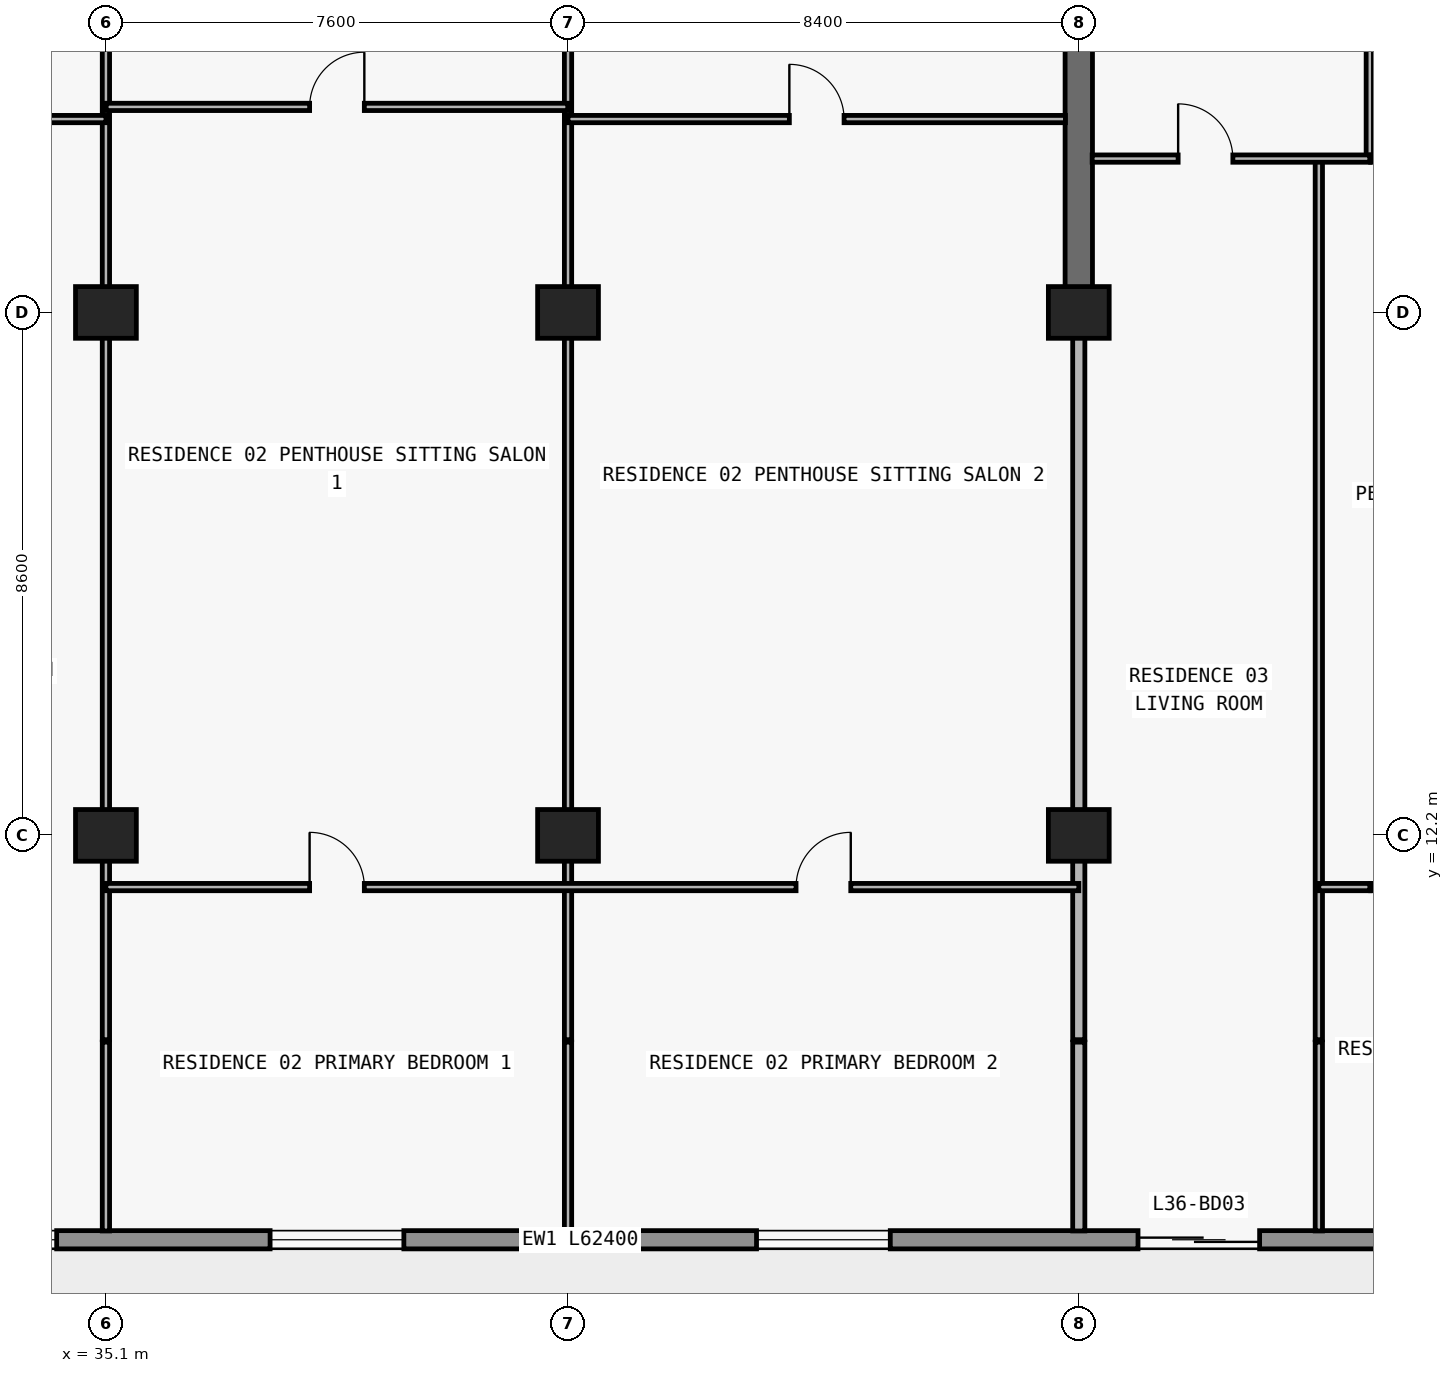
"""IFC4 building model, lengths in metres.
Left out: names, types, materials, properties, quantities, classifications, styles, units other than length and angle.
Written with IfcOpenShell. Run it as: python <this file> out.ifc"""

import sys

from ifc_helpers import new_model, si_unit, direction, frame, frame_2d, origin, origin_2d, place, context, subcontext, project, spatial, rectangle, extrude, element, fill, save


model = new_model("IFC4")
c1 = context("Model", 3, precision=1e-05, world=origin(), true_north=direction((0.0, 1.0)))
c2 = subcontext(c1, "Body", "Model", "MODEL_VIEW")
j1 = project(units=[si_unit("LENGTHUNIT", "METRE"), si_unit("PLANEANGLEUNIT", "RADIAN")], contexts=[c1])
p1 = place(None, origin())
s1 = spatial("IfcSite", under=j1, at=p1, CompositionType="ELEMENT")
p2 = place(p1, origin())
s2 = spatial("IfcBuilding", under=s1, at=p2, CompositionType="ELEMENT")
p3 = place(p2, frame((0.0, 0.0, 132.3)))
s3 = spatial("IfcBuildingStorey", under=s2, at=p3, CompositionType="ELEMENT", Elevation=132.3)
for number, where, z_axis, x_axis in (
    (1, (35.1, 12.2, 0.0), (0.0, 0.0, 1.0), (1.0, 0.0, 0.0)),
    (2, (42.7, 12.2, 0.0), (0.0, 0.0, 1.0), (1.0, 0.0, 0.0)),
    (3, (51.1, 12.2, 0.0), (0.0, 0.0, 1.0), (1.0, 0.0, 0.0)),
    (4, (35.1, 20.8, 0.0), (0.0, 0.0, 1.0), (1.0, 0.0, 0.0)),
    (5, (42.7, 20.8, 0.0), (0.0, 0.0, 1.0), (1.0, 0.0, 0.0)),
    (6, (51.1, 20.8, 0.0), (0.0, 0.0, 1.0), (1.0, 0.0, 0.0)),
):
    element("IfcColumn", number, at=place(p3, frame(where, z_axis=z_axis, x_axis=x_axis)), inside=s3, PredefinedType="COLUMN", context=c2, shape_type="SweptSolid", body=[
        extrude(rectangle(XDim=1.0, YDim=0.85, at=origin_2d()), origin(), (0.0, 0.0, 1.0), 3.05),
    ])
p4 = place(p3, frame((51.1, 20.8, 0.0), z_axis=(0.0, 0.0, 1.0), x_axis=(0.0, 1.0, 0.0)))
e7 = element("IfcWall", 7, at=p4, inside=s3, PredefinedType="SHEAR", context=c2, shape_type="SweptSolid", body=[
    extrude(rectangle(XDim=8.6, YDim=0.45, at=frame_2d((4.3, 0.0))), origin(), (0.0, 0.0, 1.0), 3.05),
])
p5 = place(p3, frame((70.1, 5.55, 0.0), z_axis=(0.0, 0.0, 1.0), x_axis=(-1.0, 0.0, 0.0)))
e8 = element("IfcWall", 8, at=p5, inside=s3, PredefinedType="STANDARD", context=c2, shape_type="SweptSolid", body=[
    extrude(rectangle(XDim=62.4, YDim=0.3, at=frame_2d((31.2, 0.0))), origin(), (0.0, 0.0, 1.0), 3.05),
])
p6 = place(p5, frame((57.29, 0.0, 0.0)))
e9 = element("IfcOpeningElement", 9, at=p6, cuts=e8, PredefinedType="OPENING", context=c2, shape_type="SweptSolid", body=[
    extrude(rectangle(XDim=2.0, YDim=2.3, at=frame_2d((1.0, 1.15))), frame((0.0, 0.16, 0.0), z_axis=(0.0, -1.0, 0.0), x_axis=(1.0, 0.0, 0.0)), (0.0, 0.0, 1.0), 0.32),
])
p7 = place(p5, frame((52.61, 0.0, 0.65)))
e10 = element("IfcOpeningElement", 10, at=p7, cuts=e8, PredefinedType="OPENING", context=c2, shape_type="SweptSolid", body=[
    extrude(rectangle(XDim=2.6, YDim=1.85, at=frame_2d((1.3, 0.925))), frame((0.0, 0.16, 0.0), z_axis=(0.0, -1.0, 0.0), x_axis=(1.0, 0.0, 0.0)), (0.0, 0.0, 1.0), 0.32),
])
p8 = place(p5, frame((46.5, 0.0, 0.85)))
e11 = element("IfcOpeningElement", 11, at=p8, cuts=e8, PredefinedType="OPENING", context=c2, shape_type="SweptSolid", body=[
    extrude(rectangle(XDim=2.2, YDim=1.55, at=frame_2d((1.1, 0.775))), frame((0.0, 0.16, 0.0), z_axis=(0.0, -1.0, 0.0), x_axis=(1.0, 0.0, 0.0)), (0.0, 0.0, 1.0), 0.32),
])
p9 = place(p5, frame((40.49, 0.0, 0.0)))
e12 = element("IfcOpeningElement", 12, at=p9, cuts=e8, PredefinedType="OPENING", context=c2, shape_type="SweptSolid", body=[
    extrude(rectangle(XDim=2.0, YDim=2.3, at=frame_2d((1.0, 1.15))), frame((0.0, 0.16, 0.0), z_axis=(0.0, -1.0, 0.0), x_axis=(1.0, 0.0, 0.0)), (0.0, 0.0, 1.0), 0.32),
])
p10 = place(p5, frame((35.81, 0.0, 0.65)))
e13 = element("IfcOpeningElement", 13, at=p10, cuts=e8, PredefinedType="OPENING", context=c2, shape_type="SweptSolid", body=[
    extrude(rectangle(XDim=2.6, YDim=1.85, at=frame_2d((1.3, 0.925))), frame((0.0, 0.16, 0.0), z_axis=(0.0, -1.0, 0.0), x_axis=(1.0, 0.0, 0.0)), (0.0, 0.0, 1.0), 0.32),
])
p11 = place(p5, frame((30.1, 0.0, 0.85)))
e14 = element("IfcOpeningElement", 14, at=p11, cuts=e8, PredefinedType="OPENING", context=c2, shape_type="SweptSolid", body=[
    extrude(rectangle(XDim=2.2, YDim=1.55, at=frame_2d((1.1, 0.775))), frame((0.0, 0.16, 0.0), z_axis=(0.0, -1.0, 0.0), x_axis=(1.0, 0.0, 0.0)), (0.0, 0.0, 1.0), 0.32),
])
p12 = place(p5, frame((22.1, 0.0, 0.85)))
e15 = element("IfcOpeningElement", 15, at=p12, cuts=e8, PredefinedType="OPENING", context=c2, shape_type="SweptSolid", body=[
    extrude(rectangle(XDim=2.2, YDim=1.55, at=frame_2d((1.1, 0.775))), frame((0.0, 0.16, 0.0), z_axis=(0.0, -1.0, 0.0), x_axis=(1.0, 0.0, 0.0)), (0.0, 0.0, 1.0), 0.32),
])
p13 = place(p5, frame((16.026, 0.0, 0.0)))
e16 = element("IfcOpeningElement", 16, at=p13, cuts=e8, PredefinedType="OPENING", context=c2, shape_type="SweptSolid", body=[
    extrude(rectangle(XDim=2.0, YDim=2.3, at=frame_2d((1.0, 1.15))), frame((0.0, 0.16, 0.0), z_axis=(0.0, -1.0, 0.0), x_axis=(1.0, 0.0, 0.0)), (0.0, 0.0, 1.0), 0.32),
])
p14 = place(p5, frame((11.726, 0.0, 0.85)))
e17 = element("IfcOpeningElement", 17, at=p14, cuts=e8, PredefinedType="OPENING", context=c2, shape_type="SweptSolid", body=[
    extrude(rectangle(XDim=2.2, YDim=1.55, at=frame_2d((1.1, 0.775))), frame((0.0, 0.16, 0.0), z_axis=(0.0, -1.0, 0.0), x_axis=(1.0, 0.0, 0.0)), (0.0, 0.0, 1.0), 0.32),
])
p15 = place(p5, frame((7.29, 0.0, 0.0)))
e18 = element("IfcOpeningElement", 18, at=p15, cuts=e8, PredefinedType="OPENING", context=c2, shape_type="SweptSolid", body=[
    extrude(rectangle(XDim=2.0, YDim=2.3, at=frame_2d((1.0, 1.15))), frame((0.0, 0.16, 0.0), z_axis=(0.0, -1.0, 0.0), x_axis=(1.0, 0.0, 0.0)), (0.0, 0.0, 1.0), 0.32),
])
p16 = place(p5, frame((3.19, 0.0, 0.85)))
e19 = element("IfcOpeningElement", 19, at=p16, cuts=e8, PredefinedType="OPENING", context=c2, shape_type="SweptSolid", body=[
    extrude(rectangle(XDim=1.8, YDim=1.55, at=frame_2d((0.9, 0.775))), frame((0.0, 0.16, 0.0), z_axis=(0.0, -1.0, 0.0), x_axis=(1.0, 0.0, 0.0)), (0.0, 0.0, 1.0), 0.32),
])
p17 = place(p3, frame((35.1, 5.695, 0.0), z_axis=(0.0, 0.0, 1.0), x_axis=(0.0, 1.0, 0.0)))
e20 = element("IfcWall", 20, at=p17, inside=s3, PredefinedType="PARTITIONING", context=c2, shape_type="SweptSolid", body=[
    extrude(rectangle(XDim=3.105, YDim=0.12, at=frame_2d((1.552, 0.0))), origin(), (0.0, 0.0, 1.0), 3.05),
])
p18 = place(p3, frame((35.1, 8.84, 0.0), z_axis=(0.0, 0.0, 1.0), x_axis=(0.0, 1.0, 0.0)))
e21 = element("IfcWall", 21, at=p18, inside=s3, PredefinedType="PARTITIONING", context=c2, shape_type="SweptSolid", body=[
    extrude(rectangle(XDim=19.94, YDim=0.12, at=frame_2d((9.97, 0.0))), origin(), (0.0, 0.0, 1.0), 2.174),
])
p19 = place(p18, frame((17.09, 0.0, 0.0)))
e22 = element("IfcOpeningElement", 22, at=p19, cuts=e21, PredefinedType="OPENING", context=c2, shape_type="SweptSolid", body=[
    extrude(rectangle(XDim=0.9, YDim=2.124, at=frame_2d((0.45, 1.062))), frame((0.0, 0.07, 0.0), z_axis=(0.0, -1.0, 0.0), x_axis=(1.0, 0.0, 0.0)), (0.0, 0.0, 1.0), 0.14),
])
p20 = place(p3, frame((42.7, 5.695, 0.0), z_axis=(0.0, 0.0, 1.0), x_axis=(0.0, 1.0, 0.0)))
e23 = element("IfcWall", 23, at=p20, inside=s3, PredefinedType="PARTITIONING", context=c2, shape_type="SweptSolid", body=[
    extrude(rectangle(XDim=3.105, YDim=0.12, at=frame_2d((1.552, 0.0))), origin(), (0.0, 0.0, 1.0), 3.05),
])
p21 = place(p3, frame((42.7, 8.84, 0.0), z_axis=(0.0, 0.0, 1.0), x_axis=(0.0, 1.0, 0.0)))
e24 = element("IfcWall", 24, at=p21, inside=s3, PredefinedType="PARTITIONING", context=c2, shape_type="SweptSolid", body=[
    extrude(rectangle(XDim=19.94, YDim=0.12, at=frame_2d((9.97, 0.0))), origin(), (0.0, 0.0, 1.0), 2.174),
])
p22 = place(p21, frame((17.09, 0.0, 0.0)))
e25 = element("IfcOpeningElement", 25, at=p22, cuts=e24, PredefinedType="OPENING", context=c2, shape_type="SweptSolid", body=[
    extrude(rectangle(XDim=0.9, YDim=2.124, at=frame_2d((0.45, 1.062))), frame((0.0, 0.07, 0.0), z_axis=(0.0, -1.0, 0.0), x_axis=(1.0, 0.0, 0.0)), (0.0, 0.0, 1.0), 0.14),
])
p23 = place(p3, frame((51.1, 5.695, 0.0), z_axis=(0.0, 0.0, 1.0), x_axis=(0.0, 1.0, 0.0)))
e26 = element("IfcWall", 26, at=p23, inside=s3, PredefinedType="PARTITIONING", context=c2, shape_type="SweptSolid", body=[
    extrude(rectangle(XDim=3.105, YDim=0.2, at=frame_2d((1.552, 0.0))), origin(), (0.0, 0.0, 1.0), 3.05),
])
p24 = place(p3, frame((51.1, 8.84, 0.0), z_axis=(0.0, 0.0, 1.0), x_axis=(0.0, 1.0, 0.0)))
e27 = element("IfcWall", 27, at=p24, inside=s3, PredefinedType="PARTITIONING", context=c2, shape_type="SweptSolid", body=[
    extrude(rectangle(XDim=11.955, YDim=0.2, at=frame_2d((5.978, 0.0))), origin(), (0.0, 0.0, 1.0), 2.174),
])
p25 = place(p3, frame((55.048, 5.695, 0.0), z_axis=(0.0, 0.0, 1.0), x_axis=(0.0, 1.0, 0.0)))
e28 = element("IfcWall", 28, at=p25, inside=s3, PredefinedType="PARTITIONING", context=c2, shape_type="SweptSolid", body=[
    extrude(rectangle(XDim=3.105, YDim=0.12, at=frame_2d((1.552, 0.0))), origin(), (0.0, 0.0, 1.0), 3.05),
])
p26 = place(p3, frame((55.048, 8.84, 0.0), z_axis=(0.0, 0.0, 1.0), x_axis=(0.0, 1.0, 0.0)))
e29 = element("IfcWall", 29, at=p26, inside=s3, PredefinedType="PARTITIONING", context=c2, shape_type="SweptSolid", body=[
    extrude(rectangle(XDim=14.49, YDim=0.12, at=frame_2d((7.245, 0.0))), origin(), (0.0, 0.0, 1.0), 3.05),
])
p27 = place(p3, frame((55.886, 23.33, 0.0), z_axis=(0.0, 0.0, 1.0), x_axis=(0.0, 1.0, 0.0)))
e30 = element("IfcWall", 30, at=p27, inside=s3, PredefinedType="PARTITIONING", context=c2, shape_type="SweptSolid", body=[
    extrude(rectangle(XDim=5.15, YDim=0.12, at=frame_2d((2.575, 0.0))), origin(), (0.0, 0.0, 1.0), 3.05),
])
p28 = place(p27, frame((2.125, 0.0, 0.0)))
e31 = element("IfcOpeningElement", 31, at=p28, cuts=e30, PredefinedType="OPENING", context=c2, shape_type="SweptSolid", body=[
    extrude(rectangle(XDim=0.9, YDim=2.15, at=frame_2d((0.45, 1.075))), frame((0.0, 0.07, 0.0), z_axis=(0.0, -1.0, 0.0), x_axis=(1.0, 0.0, 0.0)), (0.0, 0.0, 1.0), 0.14),
])
p29 = place(p3, frame((35.1, 11.35, 0.0), z_axis=(0.0, 0.0, 1.0), x_axis=(1.0, 0.0, 0.0)))
e32 = element("IfcWall", 32, at=p29, inside=s3, PredefinedType="PARTITIONING", context=c2, shape_type="SweptSolid", body=[
    extrude(rectangle(XDim=16.0, YDim=0.12, at=frame_2d((8.0, 0.0))), origin(), (0.0, 0.0, 1.0), 3.05),
])
p30 = place(p29, frame((3.35, 0.0, 0.0)))
e33 = element("IfcOpeningElement", 33, at=p30, cuts=e32, PredefinedType="OPENING", context=c2, shape_type="SweptSolid", body=[
    extrude(rectangle(XDim=0.9, YDim=2.15, at=frame_2d((0.45, 1.075))), frame((0.0, 0.07, 0.0), z_axis=(0.0, -1.0, 0.0), x_axis=(1.0, 0.0, 0.0)), (0.0, 0.0, 1.0), 0.14),
])
p31 = place(p29, frame((11.35, 0.0, 0.0)))
e34 = element("IfcOpeningElement", 34, at=p31, cuts=e32, PredefinedType="OPENING", context=c2, shape_type="SweptSolid", body=[
    extrude(rectangle(XDim=0.9, YDim=2.15, at=frame_2d((0.45, 1.075))), frame((0.0, 0.07, 0.0), z_axis=(0.0, -1.0, 0.0), x_axis=(1.0, 0.0, 0.0)), (0.0, 0.0, 1.0), 0.14),
])
p32 = place(p3, frame((55.048, 11.35, 0.0), z_axis=(0.0, 0.0, 1.0), x_axis=(1.0, 0.0, 0.0)))
e35 = element("IfcWall", 35, at=p32, inside=s3, PredefinedType="PARTITIONING", context=c2, shape_type="SweptSolid", body=[
    extrude(rectangle(XDim=0.838, YDim=0.12, at=frame_2d((0.419, 0.0))), origin(), (0.0, 0.0, 1.0), 3.05),
])
p33 = place(p3, frame((55.9, 11.35, 0.0), z_axis=(0.0, 0.0, 1.0), x_axis=(1.0, 0.0, 0.0)))
e36 = element("IfcWall", 36, at=p33, inside=s3, PredefinedType="PARTITIONING", context=c2, shape_type="SweptSolid", body=[
    extrude(rectangle(XDim=3.6, YDim=0.12, at=frame_2d((1.8, 0.0))), origin(), (0.0, 0.0, 1.0), 3.05),
])
p34 = place(p33, frame((1.35, 0.0, 0.0)))
e37 = element("IfcOpeningElement", 37, at=p34, cuts=e36, PredefinedType="OPENING", context=c2, shape_type="SweptSolid", body=[
    extrude(rectangle(XDim=0.9, YDim=2.15, at=frame_2d((0.45, 1.075))), frame((0.0, 0.07, 0.0), z_axis=(0.0, -1.0, 0.0), x_axis=(1.0, 0.0, 0.0)), (0.0, 0.0, 1.0), 0.14),
])
p35 = place(p3, frame((51.32, 23.33, 0.0), z_axis=(0.0, 0.0, 1.0), x_axis=(1.0, 0.0, 0.0)))
e38 = element("IfcWall", 38, at=p35, inside=s3, PredefinedType="PARTITIONING", context=c2, shape_type="SweptSolid", body=[
    extrude(rectangle(XDim=4.566, YDim=0.12, at=frame_2d((2.283, 0.0))), origin(), (0.0, 0.0, 1.0), 3.05),
])
p36 = place(p35, frame((1.414, 0.0, 0.0)))
e39 = element("IfcOpeningElement", 39, at=p36, cuts=e38, PredefinedType="OPENING", context=c2, shape_type="SweptSolid", body=[
    extrude(rectangle(XDim=0.9, YDim=2.15, at=frame_2d((0.45, 1.075))), frame((0.0, 0.07, 0.0), z_axis=(0.0, -1.0, 0.0), x_axis=(1.0, 0.0, 0.0)), (0.0, 0.0, 1.0), 0.14),
])
p37 = place(p3, frame((55.9, 23.33, 0.0), z_axis=(0.0, 0.0, 1.0), x_axis=(1.0, 0.0, 0.0)))
e40 = element("IfcWall", 40, at=p37, inside=s3, PredefinedType="PARTITIONING", context=c2, shape_type="SweptSolid", body=[
    extrude(rectangle(XDim=3.6, YDim=0.12, at=frame_2d((1.8, 0.0))), origin(), (0.0, 0.0, 1.0), 3.05),
])
p38 = place(p37, frame((1.35, 0.0, 0.0)))
e41 = element("IfcOpeningElement", 41, at=p38, cuts=e40, PredefinedType="OPENING", context=c2, shape_type="SweptSolid", body=[
    extrude(rectangle(XDim=0.9, YDim=2.15, at=frame_2d((0.45, 1.075))), frame((0.0, 0.07, 0.0), z_axis=(0.0, -1.0, 0.0), x_axis=(1.0, 0.0, 0.0)), (0.0, 0.0, 1.0), 0.14),
])
p39 = place(p3, frame((26.92, 23.98, 0.0), z_axis=(0.0, 0.0, 1.0), x_axis=(1.0, 0.0, 0.0)))
e42 = element("IfcWall", 42, at=p39, inside=s3, PredefinedType="PARTITIONING", context=c2, shape_type="SweptSolid", body=[
    extrude(rectangle(XDim=8.18, YDim=0.12, at=frame_2d((4.09, 0.0))), origin(), (0.0, 0.0, 1.0), 3.05),
])
p40 = place(p39, frame((1.204, 0.0, 0.0)))
e43 = element("IfcOpeningElement", 43, at=p40, cuts=e42, PredefinedType="OPENING", context=c2, shape_type="SweptSolid", body=[
    extrude(rectangle(XDim=0.9, YDim=2.15, at=frame_2d((0.45, 1.075))), frame((0.0, 0.07, 0.0), z_axis=(0.0, -1.0, 0.0), x_axis=(1.0, 0.0, 0.0)), (0.0, 0.0, 1.0), 0.14),
])
p41 = place(p3, frame((42.7, 23.98, 0.0), z_axis=(0.0, 0.0, 1.0), x_axis=(1.0, 0.0, 0.0)))
e44 = element("IfcWall", 44, at=p41, inside=s3, PredefinedType="PARTITIONING", context=c2, shape_type="SweptSolid", body=[
    extrude(rectangle(XDim=8.18, YDim=0.12, at=frame_2d((4.09, 0.0))), origin(), (0.0, 0.0, 1.0), 3.05),
])
p42 = place(p41, frame((3.64, 0.0, 0.0)))
e45 = element("IfcOpeningElement", 45, at=p42, cuts=e44, PredefinedType="OPENING", context=c2, shape_type="SweptSolid", body=[
    extrude(rectangle(XDim=0.9, YDim=2.15, at=frame_2d((0.45, 1.075))), frame((0.0, 0.07, 0.0), z_axis=(0.0, -1.0, 0.0), x_axis=(1.0, 0.0, 0.0)), (0.0, 0.0, 1.0), 0.14),
])
p43 = place(p3, frame((35.105, 24.18, 0.0), z_axis=(0.0, 0.0, 1.0), x_axis=(1.0, 0.0, 0.0)))
e46 = element("IfcWall", 46, at=p43, inside=s3, PredefinedType="PARTITIONING", context=c2, shape_type="SweptSolid", body=[
    extrude(rectangle(XDim=7.59, YDim=0.12, at=frame_2d((3.795, 0.0))), origin(), (0.0, 0.0, 1.0), 3.05),
])
p44 = place(p43, frame((3.345, 0.0, 0.0)))
e47 = element("IfcOpeningElement", 47, at=p44, cuts=e46, PredefinedType="OPENING", context=c2, shape_type="SweptSolid", body=[
    extrude(rectangle(XDim=0.9, YDim=2.15, at=frame_2d((0.45, 1.075))), frame((0.0, 0.07, 0.0), z_axis=(0.0, -1.0, 0.0), x_axis=(1.0, 0.0, 0.0)), (0.0, 0.0, 1.0), 0.14),
])
p45 = place(p10, origin())
e48 = element("IfcWindow", 48, at=p45, inside=s3, PartitioningType="SINGLE_PANEL", PredefinedType="WINDOW", context=c2, shape_type="SweptSolid", body=[
    extrude(rectangle(XDim=2.6, YDim=1.85, at=frame_2d((1.3, 0.925))), frame((0.0, 0.03, 0.0), z_axis=(0.0, -1.0, 0.0), x_axis=(1.0, 0.0, 0.0)), (0.0, 0.0, 1.0), 0.06),
])
fill(e13, e48)
p46 = place(p11, origin())
e49 = element("IfcWindow", 49, at=p46, inside=s3, PartitioningType="SINGLE_PANEL", PredefinedType="WINDOW", context=c2, shape_type="SweptSolid", body=[
    extrude(rectangle(XDim=2.2, YDim=1.55, at=frame_2d((1.1, 0.775))), frame((0.0, 0.03, 0.0), z_axis=(0.0, -1.0, 0.0), x_axis=(1.0, 0.0, 0.0)), (0.0, 0.0, 1.0), 0.06),
])
fill(e14, e49)
p47 = place(p12, origin())
e50 = element("IfcWindow", 50, at=p47, inside=s3, PartitioningType="SINGLE_PANEL", PredefinedType="WINDOW", context=c2, shape_type="SweptSolid", body=[
    extrude(rectangle(XDim=2.2, YDim=1.55, at=frame_2d((1.1, 0.775))), frame((0.0, 0.03, 0.0), z_axis=(0.0, -1.0, 0.0), x_axis=(1.0, 0.0, 0.0)), (0.0, 0.0, 1.0), 0.06),
])
fill(e15, e50)
p48 = place(p13, origin())
e51 = element("IfcDoor", 51, at=p48, inside=s3, OperationType="DOUBLE_DOOR_SLIDING", PredefinedType="DOOR", context=c2, shape_type="SweptSolid", body=[
    extrude(rectangle(XDim=2.0, YDim=2.3, at=frame_2d((1.0, 1.15))), frame((0.0, 0.025, 0.0), z_axis=(0.0, -1.0, 0.0), x_axis=(1.0, 0.0, 0.0)), (0.0, 0.0, 1.0), 0.05),
])
fill(e16, e51)
p49 = place(p44, origin())
e52 = element("IfcDoor", 52, at=p49, inside=s3, OperationType="SINGLE_SWING_RIGHT", PredefinedType="DOOR", context=c2, shape_type="SweptSolid", body=[
    extrude(rectangle(XDim=0.9, YDim=2.15, at=frame_2d((0.45, 1.075))), frame((0.0, 0.025, 0.0), z_axis=(0.0, -1.0, 0.0), x_axis=(1.0, 0.0, 0.0)), (0.0, 0.0, 1.0), 0.05),
])
fill(e47, e52)
p50 = place(p30, origin())
e53 = element("IfcDoor", 53, at=p50, inside=s3, OperationType="SINGLE_SWING_LEFT", PredefinedType="DOOR", context=c2, shape_type="SweptSolid", body=[
    extrude(rectangle(XDim=0.9, YDim=2.15, at=frame_2d((0.45, 1.075))), frame((0.0, 0.025, 0.0), z_axis=(0.0, -1.0, 0.0), x_axis=(1.0, 0.0, 0.0)), (0.0, 0.0, 1.0), 0.05),
])
fill(e33, e53)
p51 = place(p42, origin())
e54 = element("IfcDoor", 54, at=p51, inside=s3, OperationType="SINGLE_SWING_LEFT", PredefinedType="DOOR", context=c2, shape_type="SweptSolid", body=[
    extrude(rectangle(XDim=0.9, YDim=2.15, at=frame_2d((0.45, 1.075))), frame((0.0, 0.025, 0.0), z_axis=(0.0, -1.0, 0.0), x_axis=(1.0, 0.0, 0.0)), (0.0, 0.0, 1.0), 0.05),
])
fill(e45, e54)
p52 = place(p31, origin())
e55 = element("IfcDoor", 55, at=p52, inside=s3, OperationType="SINGLE_SWING_RIGHT", PredefinedType="DOOR", context=c2, shape_type="SweptSolid", body=[
    extrude(rectangle(XDim=0.9, YDim=2.15, at=frame_2d((0.45, 1.075))), frame((0.0, 0.025, 0.0), z_axis=(0.0, -1.0, 0.0), x_axis=(1.0, 0.0, 0.0)), (0.0, 0.0, 1.0), 0.05),
])
fill(e34, e55)
p53 = place(p36, origin())
e56 = element("IfcDoor", 56, at=p53, inside=s3, OperationType="SINGLE_SWING_LEFT", PredefinedType="DOOR", context=c2, shape_type="SweptSolid", body=[
    extrude(rectangle(XDim=0.9, YDim=2.15, at=frame_2d((0.45, 1.075))), frame((0.0, 0.025, 0.0), z_axis=(0.0, -1.0, 0.0), x_axis=(1.0, 0.0, 0.0)), (0.0, 0.0, 1.0), 0.05),
])
fill(e39, e56)
save(model, sys.argv[1])
